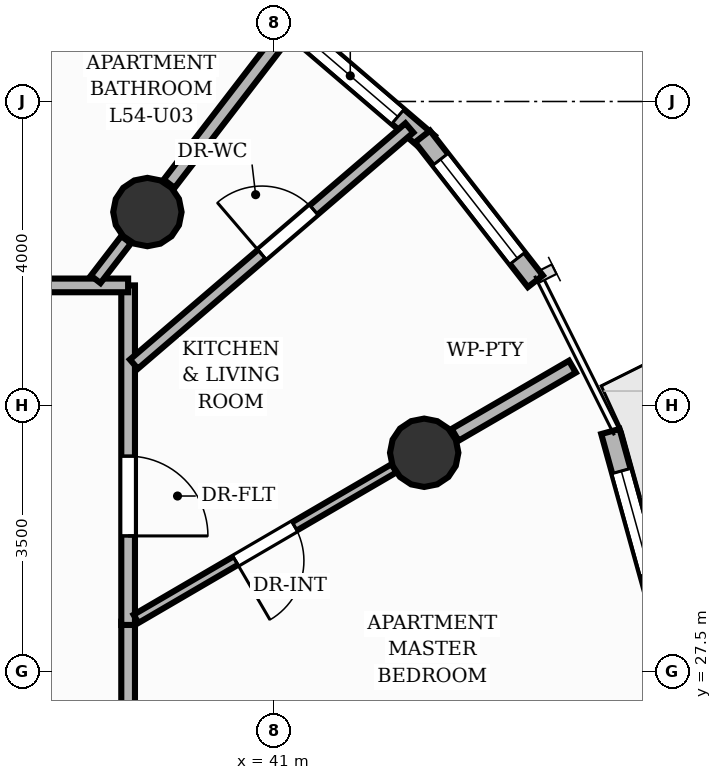
"""IFC4 building model, lengths in metres.
Left out: names, types, materials, properties, quantities, classifications, styles, units other than length and angle.
Written with IfcOpenShell. Run it as: python <this file> out.ifc"""

import sys

from ifc_helpers import new_model, si_unit, direction, frame, frame_2d, origin, origin_2d, place, context, subcontext, project, spatial, rectangle, circle, extrude, element, fill, save


model = new_model("IFC4")
c1 = context("Model", 3, precision=1e-05, world=origin(), true_north=direction((0.0, 1.0)))
c2 = subcontext(c1, "Body", "Model", "MODEL_VIEW")
j1 = project(units=[si_unit("LENGTHUNIT", "METRE"), si_unit("PLANEANGLEUNIT", "RADIAN")], contexts=[c1])
p1 = place(None, origin())
s1 = spatial("IfcSite", under=j1, at=p1, CompositionType="ELEMENT")
p2 = place(p1, origin())
s2 = spatial("IfcBuilding", under=s1, at=p2, CompositionType="ELEMENT")
p3 = place(p2, frame((0.0, 0.0, 182.24)))
s3 = spatial("IfcBuildingStorey", under=s2, at=p3, CompositionType="ELEMENT", Elevation=182.24)
for number, where, z_axis, x_axis in (
    (1, (42.975, 30.378, 0.0), (0.0, 0.0, 1.0), (1.0, 0.0, 0.0)),
    (2, (39.333, 33.545, 0.0), (0.0, 0.0, 1.0), (1.0, 0.0, 0.0)),
):
    element("IfcColumn", number, at=place(p3, frame(where, z_axis=z_axis, x_axis=x_axis)), inside=s3, PredefinedType="COLUMN", context=c2, shape_type="SweptSolid", body=[
        extrude(circle(Radius=0.45, at=origin_2d()), origin(), (0.0, 0.0, 1.0), 3.2),
    ])
p4 = place(p3, frame((41.198, 36.027, 0.0), z_axis=(0.0, 0.0, 1.0), x_axis=(0.759591927835, -0.65039995631, 0.0)))
e3 = element("IfcWall", 3, at=p4, inside=s3, PredefinedType="SOLIDWALL", context=c2, shape_type="SweptSolid", body=[
    extrude(rectangle(XDim=2.415, YDim=0.25, at=frame_2d((1.208, 0.0))), origin(), (0.0, 0.0, 1.0), 2.96),
])
p5 = place(p4, frame((0.234, 0.0, 0.85)))
e4 = element("IfcOpeningElement", 4, at=p5, cuts=e3, PredefinedType="OPENING", context=c2, shape_type="SweptSolid", body=[
    extrude(rectangle(XDim=1.65, YDim=1.52, at=frame_2d((0.825, 0.76))), frame((0.0, 0.135, 0.0), z_axis=(0.0, -1.0, 0.0), x_axis=(1.0, 0.0, 0.0)), (0.0, 0.0, 1.0), 0.27),
])
p6 = place(p3, frame((45.425, 30.658, 0.0), z_axis=(0.0, 0.0, 1.0), x_axis=(0.266734060973, -0.96377017007, 0.0)))
e5 = element("IfcWall", 5, at=p6, inside=s3, PredefinedType="SOLIDWALL", context=c2, shape_type="SweptSolid", body=[
    extrude(rectangle(XDim=2.478, YDim=0.25, at=frame_2d((1.239, 0.0))), origin(), (0.0, 0.0, 1.0), 2.96),
])
p7 = place(p6, frame((0.539, 0.0, 0.85)))
e6 = element("IfcOpeningElement", 6, at=p7, cuts=e5, PredefinedType="OPENING", context=c2, shape_type="SweptSolid", body=[
    extrude(rectangle(XDim=1.4, YDim=1.55, at=frame_2d((0.7, 0.775))), frame((0.0, 0.135, 0.0), z_axis=(0.0, -1.0, 0.0), x_axis=(1.0, 0.0, 0.0)), (0.0, 0.0, 1.0), 0.27),
])
p8 = place(p3, frame((42.953, 34.539, 0.0), z_axis=(0.0, 0.0, 1.0), x_axis=(0.61468225386, -0.788774826417, 0.0)))
e7 = element("IfcWall", 7, at=p8, inside=s3, PredefinedType="SOLIDWALL", context=c2, shape_type="SweptSolid", body=[
    extrude(rectangle(XDim=2.415, YDim=0.25, at=frame_2d((1.208, 0.0))), origin(), (0.0, 0.0, 1.0), 2.96),
])
p9 = place(p8, frame((0.382, 0.0, 0.85)))
e8 = element("IfcOpeningElement", 8, at=p9, cuts=e7, PredefinedType="OPENING", context=c2, shape_type="SweptSolid", body=[
    extrude(rectangle(XDim=1.65, YDim=1.55, at=frame_2d((0.825, 0.775))), frame((0.0, 0.135, 0.0), z_axis=(0.0, -1.0, 0.0), x_axis=(1.0, 0.0, 0.0)), (0.0, 0.0, 1.0), 0.27),
])
p10 = place(p3, frame((43.382, 30.614, 0.0), z_axis=(0.0, 0.0, 1.0), x_axis=(0.86456661279, 0.502518230563, 0.0)))
e9 = element("IfcWall", 9, at=p10, inside=s3, PredefinedType="PARTITIONING", context=c2, shape_type="SweptSolid", body=[
    extrude(rectangle(XDim=1.785, YDim=0.18, at=frame_2d((0.893, 0.0))), origin(), (0.0, 0.0, 1.0), 2.403),
])
p11 = place(p3, frame((39.62, 33.918, 0.0), z_axis=(0.0, 0.0, 1.0), x_axis=(0.609164681512, 0.793043750873, 0.0)))
e10 = element("IfcWall", 10, at=p11, inside=s3, PredefinedType="PARTITIONING", context=c2, shape_type="SweptSolid", body=[
    extrude(rectangle(XDim=2.572, YDim=0.18, at=frame_2d((1.286, 0.0))), origin(), (0.0, 0.0, 1.0), 2.403),
])
p12 = place(p3, frame((39.08, 28.156, 0.0), z_axis=(0.0, 0.0, 1.0), x_axis=(0.0, -1.0, 0.0)))
e11 = element("IfcWall", 11, at=p12, inside=s3, PredefinedType="PARTITIONING", context=c2, shape_type="SweptSolid", body=[
    extrude(rectangle(XDim=12.736, YDim=0.18, at=frame_2d((6.368, 0.0))), origin(), (0.0, 0.0, 1.0), 2.955),
])
p13 = place(p12, frame((4.269, 0.0, 0.0)))
e12 = element("IfcOpeningElement", 12, at=p13, cuts=e11, PredefinedType="OPENING", context=c2, shape_type="SweptSolid", body=[
    extrude(rectangle(XDim=1.05, YDim=2.15, at=frame_2d((0.525, 1.075))), frame((0.0, 0.1, 0.0), z_axis=(0.0, -1.0, 0.0), x_axis=(1.0, 0.0, 0.0)), (0.0, 0.0, 1.0), 0.2),
])
p14 = place(p3, frame((39.08, 32.58, 0.0), z_axis=(0.0, 0.0, 1.0), x_axis=(0.0, -1.0, 0.0)))
e13 = element("IfcWall", 13, at=p14, inside=s3, PredefinedType="PARTITIONING", context=c2, shape_type="SweptSolid", body=[
    extrude(rectangle(XDim=4.468, YDim=0.18, at=frame_2d((2.234, 0.0))), origin(), (0.0, 0.0, 1.0), 2.955),
])
p15 = place(p14, frame((2.246, 0.0, 0.0)))
e14 = element("IfcOpeningElement", 14, at=p15, cuts=e13, PredefinedType="OPENING", context=c2, shape_type="SweptSolid", body=[
    extrude(rectangle(XDim=1.05, YDim=2.15, at=frame_2d((0.525, 1.075))), frame((0.0, 0.1, 0.0), z_axis=(0.0, -1.0, 0.0), x_axis=(1.0, 0.0, 0.0)), (0.0, 0.0, 1.0), 0.2),
])
p16 = place(p3, frame((33.2, 32.58, 0.0), z_axis=(0.0, 0.0, 1.0), x_axis=(1.0, 0.0, 0.0)))
e15 = element("IfcWall", 15, at=p16, inside=s3, PredefinedType="PARTITIONING", context=c2, shape_type="SweptSolid", body=[
    extrude(rectangle(XDim=5.88, YDim=0.18, at=frame_2d((2.94, 0.0))), origin(), (0.0, 0.0, 1.0), 2.955),
])
p17 = place(p16, frame((2.184, 0.0, 0.0)))
e16 = element("IfcOpeningElement", 16, at=p17, cuts=e15, PredefinedType="OPENING", context=c2, shape_type="SweptSolid", body=[
    extrude(rectangle(XDim=1.05, YDim=2.15, at=frame_2d((0.525, 1.075))), frame((0.0, 0.1, 0.0), z_axis=(0.0, -1.0, 0.0), x_axis=(1.0, 0.0, 0.0)), (0.0, 0.0, 1.0), 0.2),
])
p18 = place(p3, frame((39.156, 31.544, 0.0), z_axis=(0.0, 0.0, 1.0), x_axis=(0.759083333315, 0.650993466238, 0.0)))
e17 = element("IfcWall", 17, at=p18, inside=s3, PredefinedType="PLUMBINGWALL", context=c2, shape_type="SweptSolid", body=[
    extrude(rectangle(XDim=4.775, YDim=0.16, at=frame_2d((2.387, 0.0))), origin(), (0.0, 0.0, 1.0), 2.955),
])
p19 = place(p18, frame((2.217, 0.0, 0.0)))
e18 = element("IfcOpeningElement", 18, at=p19, cuts=e17, PredefinedType="OPENING", context=c2, shape_type="SweptSolid", body=[
    extrude(rectangle(XDim=0.9, YDim=2.1, at=frame_2d((0.45, 1.05))), frame((0.0, 0.09, 0.0), z_axis=(0.0, -1.0, 0.0), x_axis=(1.0, 0.0, 0.0)), (0.0, 0.0, 1.0), 0.18),
])
p20 = place(p3, frame((42.58, 30.175, 0.0), z_axis=(0.0, 0.0, 1.0), x_axis=(-0.863675291667, -0.504048599407, 0.0)))
e19 = element("IfcWall", 19, at=p20, inside=s3, PredefinedType="PARTITIONING", context=c2, shape_type="SweptSolid", body=[
    extrude(rectangle(XDim=3.932, YDim=0.125, at=frame_2d((1.966, 0.0))), origin(), (0.0, 0.0, 1.0), 2.403),
])
p21 = place(p20, frame((1.516, 0.0, 0.0)))
e20 = element("IfcOpeningElement", 20, at=p21, cuts=e19, PredefinedType="OPENING", context=c2, shape_type="SweptSolid", body=[
    extrude(rectangle(XDim=0.9, YDim=2.1, at=frame_2d((0.45, 1.05))), frame((0.0, 0.073, 0.0), z_axis=(0.0, -1.0, 0.0), x_axis=(1.0, 0.0, 0.0)), (0.0, 0.0, 1.0), 0.145),
])
p22 = place(p3, frame((38.653, 32.659, 0.0), z_axis=(0.0, 0.0, 1.0), x_axis=(0.609101063055, 0.79309261438, 0.0)))
e21 = element("IfcWall", 21, at=p22, inside=s3, PredefinedType="PLUMBINGWALL", context=c2, shape_type="SweptSolid", body=[
    extrude(rectangle(XDim=0.658, YDim=0.16, at=frame_2d((0.329, 0.0))), origin(), (0.0, 0.0, 1.0), 2.403),
])
p23 = place(p5, origin())
e22 = element("IfcWindow", 22, at=p23, inside=s3, PartitioningType="SINGLE_PANEL", PredefinedType="WINDOW", context=c2, shape_type="SweptSolid", body=[
    extrude(rectangle(XDim=1.65, YDim=1.52, at=frame_2d((0.825, 0.76))), frame((0.0, 0.03, 0.0), z_axis=(0.0, -1.0, 0.0), x_axis=(1.0, 0.0, 0.0)), (0.0, 0.0, 1.0), 0.06),
])
fill(e4, e22)
p24 = place(p7, origin())
e23 = element("IfcWindow", 23, at=p24, inside=s3, PartitioningType="SINGLE_PANEL", PredefinedType="WINDOW", context=c2, shape_type="SweptSolid", body=[
    extrude(rectangle(XDim=1.4, YDim=1.55, at=frame_2d((0.7, 0.775))), frame((0.0, 0.03, 0.0), z_axis=(0.0, -1.0, 0.0), x_axis=(1.0, 0.0, 0.0)), (0.0, 0.0, 1.0), 0.06),
])
fill(e6, e23)
p25 = place(p9, origin())
e24 = element("IfcWindow", 24, at=p25, inside=s3, PartitioningType="SINGLE_PANEL", PredefinedType="WINDOW", context=c2, shape_type="SweptSolid", body=[
    extrude(rectangle(XDim=1.65, YDim=1.55, at=frame_2d((0.825, 0.775))), frame((0.0, 0.03, 0.0), z_axis=(0.0, -1.0, 0.0), x_axis=(1.0, 0.0, 0.0)), (0.0, 0.0, 1.0), 0.06),
])
fill(e8, e24)
p26 = place(p15, origin())
e25 = element("IfcDoor", 25, at=p26, inside=s3, OperationType="SINGLE_SWING_RIGHT", PredefinedType="DOOR", context=c2, shape_type="SweptSolid", body=[
    extrude(rectangle(XDim=1.05, YDim=2.15, at=frame_2d((0.525, 1.075))), frame((0.0, 0.025, 0.0), z_axis=(0.0, -1.0, 0.0), x_axis=(1.0, 0.0, 0.0)), (0.0, 0.0, 1.0), 0.05),
])
fill(e14, e25)
p27 = place(p19, origin())
e26 = element("IfcDoor", 26, at=p27, inside=s3, OperationType="SINGLE_SWING_LEFT", PredefinedType="DOOR", context=c2, shape_type="SweptSolid", body=[
    extrude(rectangle(XDim=0.9, YDim=2.1, at=frame_2d((0.45, 1.05))), frame((0.0, 0.025, 0.0), z_axis=(0.0, -1.0, 0.0), x_axis=(1.0, 0.0, 0.0)), (0.0, 0.0, 1.0), 0.05),
])
fill(e18, e26)
p28 = place(p21, origin())
e27 = element("IfcDoor", 27, at=p28, inside=s3, OperationType="SINGLE_SWING_RIGHT", PredefinedType="DOOR", context=c2, shape_type="SweptSolid", body=[
    extrude(rectangle(XDim=0.9, YDim=2.1, at=frame_2d((0.45, 1.05))), frame((0.0, 0.025, 0.0), z_axis=(0.0, -1.0, 0.0), x_axis=(1.0, 0.0, 0.0)), (0.0, 0.0, 1.0), 0.05),
])
fill(e20, e27)
save(model, sys.argv[1])
